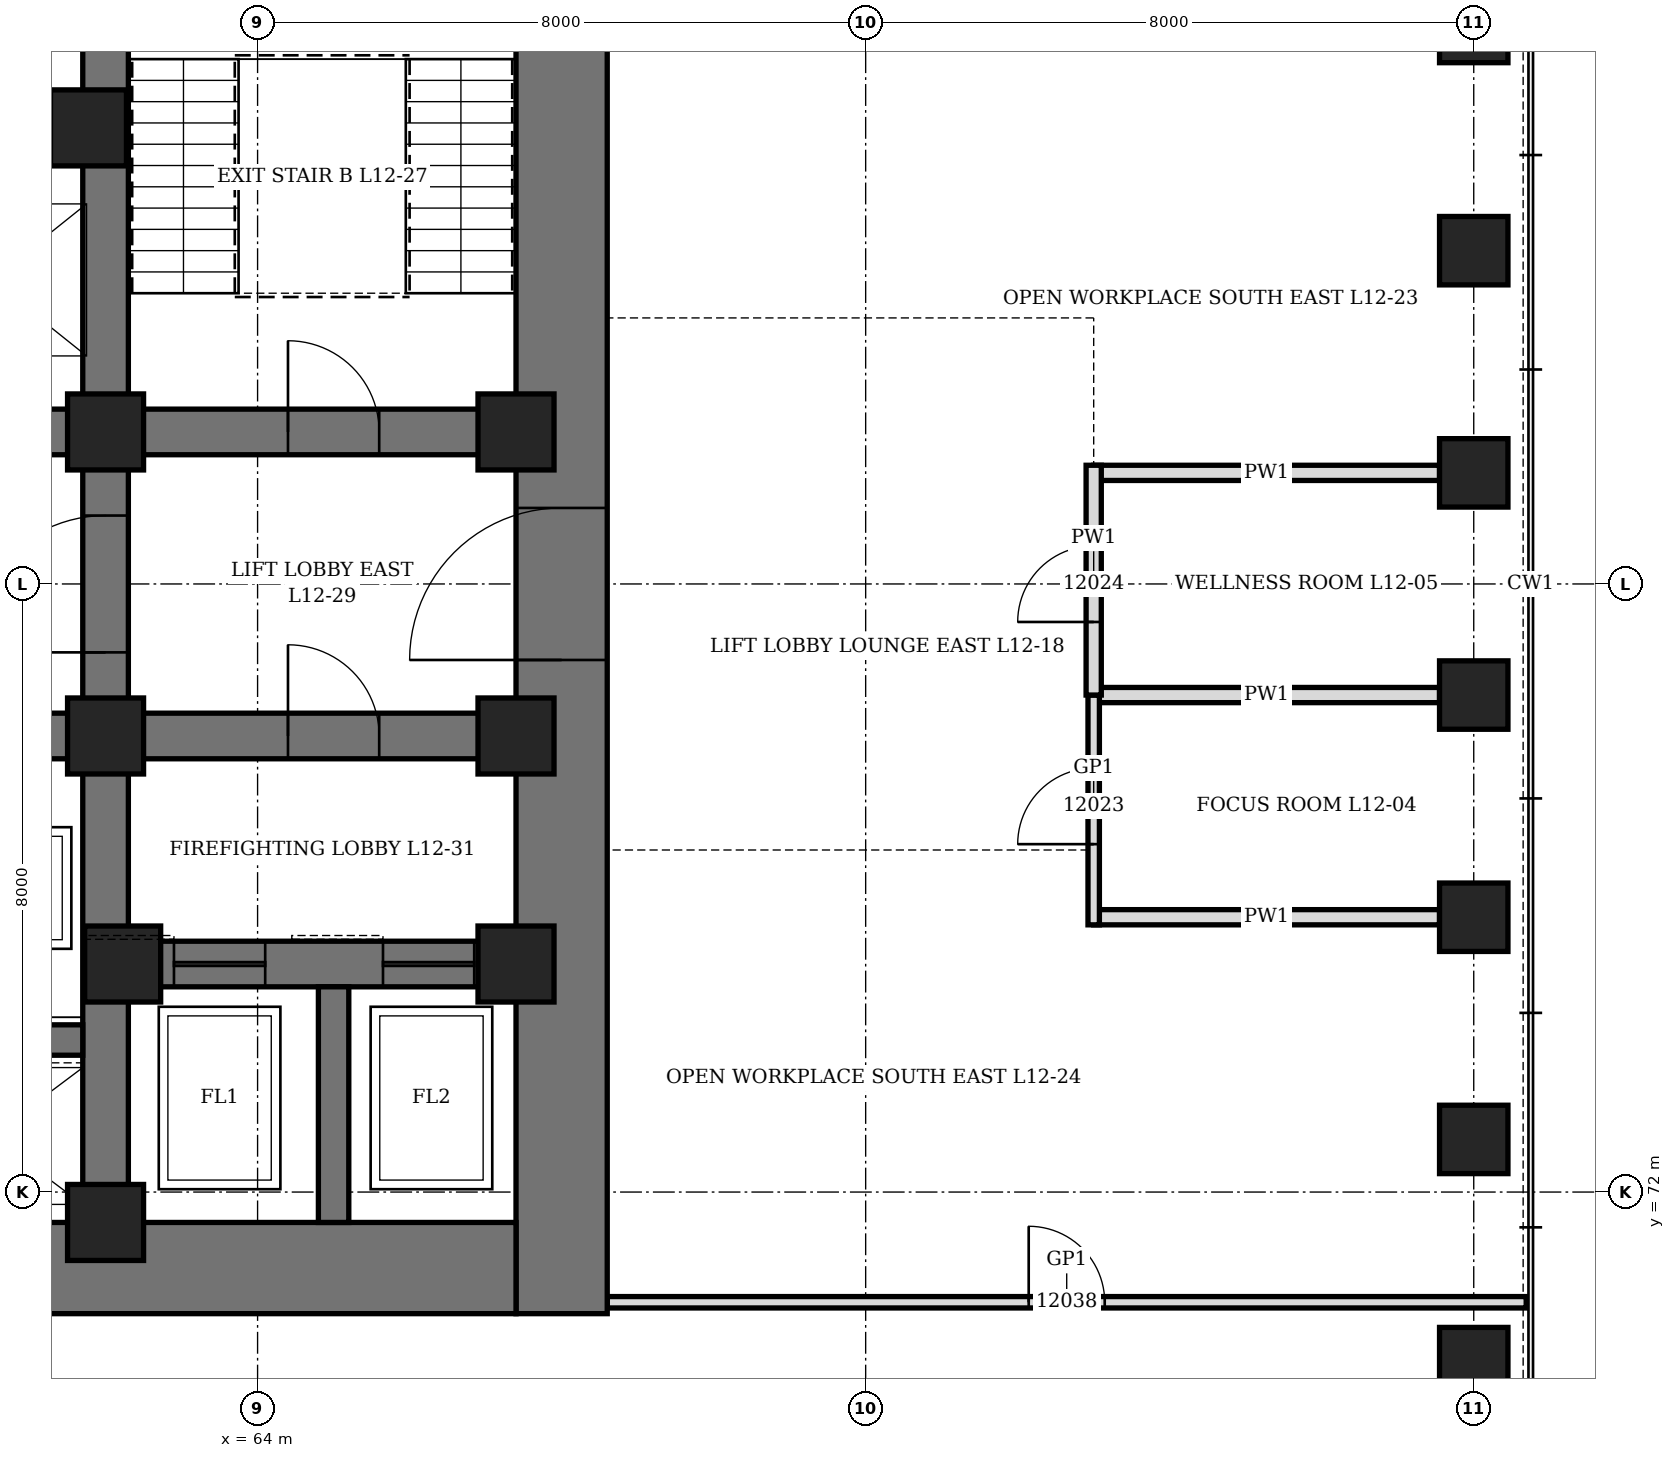
"""IFC4 building model, lengths in metres.
Left out: names, types, materials, properties, quantities, classifications, styles, units other than length and angle.
Written with IfcOpenShell. Run it as: python <this file> out.ifc"""

import sys

from ifc_helpers import new_model, si_unit, direction, frame, frame_2d, origin, origin_2d, place, context, subcontext, project, spatial, rectangle, hollow_rectangle, extrude, element, fill, save


model = new_model("IFC4")
c1 = context("Model", 3, precision=1e-05, world=origin(), true_north=direction((0.0, 1.0)))
c2 = subcontext(c1, "Body", "Model", "MODEL_VIEW")
j1 = project(units=[si_unit("LENGTHUNIT", "METRE"), si_unit("PLANEANGLEUNIT", "RADIAN")], contexts=[c1])
p1 = place(None, origin())
s1 = spatial("IfcSite", under=j1, at=p1, CompositionType="ELEMENT")
p2 = place(p1, origin())
s2 = spatial("IfcBuilding", under=s1, at=p2, CompositionType="ELEMENT")
p3 = place(p2, frame((0.0, 0.0, 60.1)))
s3 = spatial("IfcBuildingStorey", under=s2, at=p3, CompositionType="ELEMENT", Elevation=60.1)
for number, where, z_axis, x_axis in (
    (1, (80.0, 69.769, 0.0), (0.0, 0.0, 1.0), (0.0, 1.0, 0.0)),
    (2, (80.0, 72.692, 0.0), (0.0, 0.0, 1.0), (0.0, 1.0, 0.0)),
    (3, (80.0, 75.615, 0.0), (0.0, 0.0, 1.0), (0.0, 1.0, 0.0)),
    (4, (80.0, 78.539, 0.0), (0.0, 0.0, 1.0), (0.0, 1.0, 0.0)),
    (5, (80.0, 81.461, 0.0), (0.0, 0.0, 1.0), (0.0, 1.0, 0.0)),
    (6, (80.0, 84.385, 0.0), (0.0, 0.0, 1.0), (0.0, 1.0, 0.0)),
    (7, (80.0, 87.308, 0.0), (0.0, 0.0, 1.0), (0.0, 1.0, 0.0)),
):
    element("IfcColumn", number, at=place(p3, frame(where, z_axis=z_axis, x_axis=x_axis)), inside=s3, PredefinedType="COLUMN", context=c2, shape_type="SweptSolid", body=[
        extrude(hollow_rectangle(XDim=0.9, YDim=0.9, WallThickness=0.12, at=origin_2d()), origin(), (0.0, 0.0, 1.0), 4.2),
    ])
p4 = place(p3, frame((68.0, 70.4, 0.0), z_axis=(0.0, 0.0, 1.0), x_axis=(0.0, 1.0, 0.0)))
e8 = element("IfcWall", 8, at=p4, inside=s3, PredefinedType="SHEAR", context=c2, shape_type="SweptSolid", body=[
    extrude(rectangle(XDim=19.2, YDim=1.2, at=frame_2d((9.6, 0.0))), origin(), (0.0, 0.0, 1.0), 4.2),
])
p5 = place(p4, frame((8.6, 0.0, 0.0)))
e9 = element("IfcOpeningElement", 9, at=p5, cuts=e8, PredefinedType="OPENING", context=c2, shape_type="SweptSolid", body=[
    extrude(rectangle(XDim=2.0, YDim=2.4, at=frame_2d((1.0, 1.2))), frame((0.0, 0.61, 0.0), z_axis=(0.0, -1.0, 0.0), x_axis=(1.0, 0.0, 0.0)), (0.0, 0.0, 1.0), 1.22),
])
p6 = place(p3, frame((44.6, 71.0, 0.0), z_axis=(0.0, 0.0, 1.0), x_axis=(1.0, 0.0, 0.0)))
e10 = element("IfcWall", 10, at=p6, inside=s3, PredefinedType="SHEAR", context=c2, shape_type="SweptSolid", body=[
    extrude(rectangle(XDim=22.8, YDim=1.2, at=frame_2d((11.4, 0.0))), origin(), (0.0, 0.0, 1.0), 4.2),
])
p7 = place(p3, frame((62.0, 71.6, 0.0), z_axis=(0.0, 0.0, 1.0), x_axis=(0.0, 1.0, 0.0)))
e11 = element("IfcWall", 11, at=p7, inside=s3, PredefinedType="SHEAR", context=c2, shape_type="SweptSolid", body=[
    extrude(rectangle(XDim=16.8, YDim=0.6, at=frame_2d((8.4, 0.0))), origin(), (0.0, 0.0, 1.0), 4.2),
])
p8 = place(p7, frame((7.5, 0.0, 0.0)))
e12 = element("IfcOpeningElement", 12, at=p8, cuts=e11, PredefinedType="OPENING", context=c2, shape_type="SweptSolid", body=[
    extrude(rectangle(XDim=1.8, YDim=2.4, at=frame_2d((0.9, 1.2))), frame((0.0, 0.31, 0.0), z_axis=(0.0, -1.0, 0.0), x_axis=(1.0, 0.0, 0.0)), (0.0, 0.0, 1.0), 0.62),
])
p9 = place(p3, frame((62.3, 75.0, 0.0), z_axis=(0.0, 0.0, 1.0), x_axis=(1.0, 0.0, 0.0)))
e13 = element("IfcWall", 13, at=p9, inside=s3, PredefinedType="SHEAR", context=c2, shape_type="SweptSolid", body=[
    extrude(rectangle(XDim=5.1, YDim=0.6, at=frame_2d((2.55, 0.0))), origin(), (0.0, 0.0, 1.0), 4.2),
])
p10 = place(p9, frame((0.6, 0.0, 0.0)))
e14 = element("IfcOpeningElement", 14, at=p10, cuts=e13, PredefinedType="OPENING", context=c2, shape_type="SweptSolid", body=[
    extrude(rectangle(XDim=1.2, YDim=2.2, at=frame_2d((0.6, 1.1))), frame((0.0, 0.31, 0.0), z_axis=(0.0, -1.0, 0.0), x_axis=(1.0, 0.0, 0.0)), (0.0, 0.0, 1.0), 0.62),
])
p11 = place(p9, frame((3.35, 0.0, 0.0)))
e15 = element("IfcOpeningElement", 15, at=p11, cuts=e13, PredefinedType="OPENING", context=c2, shape_type="SweptSolid", body=[
    extrude(rectangle(XDim=1.2, YDim=2.2, at=frame_2d((0.6, 1.1))), frame((0.0, 0.31, 0.0), z_axis=(0.0, -1.0, 0.0), x_axis=(1.0, 0.0, 0.0)), (0.0, 0.0, 1.0), 0.62),
])
p12 = place(p3, frame((62.3, 78.0, 0.0), z_axis=(0.0, 0.0, 1.0), x_axis=(1.0, 0.0, 0.0)))
e16 = element("IfcWall", 16, at=p12, inside=s3, PredefinedType="SHEAR", context=c2, shape_type="SweptSolid", body=[
    extrude(rectangle(XDim=5.1, YDim=0.6, at=frame_2d((2.55, 0.0))), origin(), (0.0, 0.0, 1.0), 4.2),
])
p13 = place(p12, frame((2.1, 0.0, 0.0)))
e17 = element("IfcOpeningElement", 17, at=p13, cuts=e16, PredefinedType="OPENING", context=c2, shape_type="SweptSolid", body=[
    extrude(rectangle(XDim=1.2, YDim=2.1, at=frame_2d((0.6, 1.05))), frame((0.0, 0.31, 0.0), z_axis=(0.0, -1.0, 0.0), x_axis=(1.0, 0.0, 0.0)), (0.0, 0.0, 1.0), 0.62),
])
p14 = place(p3, frame((62.3, 82.0, 0.0), z_axis=(0.0, 0.0, 1.0), x_axis=(1.0, 0.0, 0.0)))
e18 = element("IfcWall", 18, at=p14, inside=s3, PredefinedType="SHEAR", context=c2, shape_type="SweptSolid", body=[
    extrude(rectangle(XDim=5.1, YDim=0.6, at=frame_2d((2.55, 0.0))), origin(), (0.0, 0.0, 1.0), 4.2),
])
p15 = place(p14, frame((2.1, 0.0, 0.0)))
e19 = element("IfcOpeningElement", 19, at=p15, cuts=e18, PredefinedType="OPENING", context=c2, shape_type="SweptSolid", body=[
    extrude(rectangle(XDim=1.2, YDim=2.1, at=frame_2d((0.6, 1.05))), frame((0.0, 0.31, 0.0), z_axis=(0.0, -1.0, 0.0), x_axis=(1.0, 0.0, 0.0)), (0.0, 0.0, 1.0), 0.62),
])
p16 = place(p3, frame((50.3, 78.0, 0.0), z_axis=(0.0, 0.0, 1.0), x_axis=(1.0, 0.0, 0.0)))
e20 = element("IfcWall", 20, at=p16, inside=s3, PredefinedType="SHEAR", context=c2, shape_type="SweptSolid", body=[
    extrude(rectangle(XDim=11.4, YDim=0.6, at=frame_2d((5.7, 0.0))), origin(), (0.0, 0.0, 1.0), 4.2),
])
p17 = place(p16, frame((0.65, 0.0, 0.0)))
e21 = element("IfcOpeningElement", 21, at=p17, cuts=e20, PredefinedType="OPENING", context=c2, shape_type="SweptSolid", body=[
    extrude(rectangle(XDim=1.1, YDim=2.2, at=frame_2d((0.55, 1.1))), frame((0.0, 0.31, 0.0), z_axis=(0.0, -1.0, 0.0), x_axis=(1.0, 0.0, 0.0)), (0.0, 0.0, 1.0), 0.62),
])
p18 = place(p16, frame((3.65, 0.0, 0.0)))
e22 = element("IfcOpeningElement", 22, at=p18, cuts=e20, PredefinedType="OPENING", context=c2, shape_type="SweptSolid", body=[
    extrude(rectangle(XDim=1.1, YDim=2.2, at=frame_2d((0.55, 1.1))), frame((0.0, 0.31, 0.0), z_axis=(0.0, -1.0, 0.0), x_axis=(1.0, 0.0, 0.0)), (0.0, 0.0, 1.0), 0.62),
])
p19 = place(p16, frame((6.65, 0.0, 0.0)))
e23 = element("IfcOpeningElement", 23, at=p19, cuts=e20, PredefinedType="OPENING", context=c2, shape_type="SweptSolid", body=[
    extrude(rectangle(XDim=1.1, YDim=2.2, at=frame_2d((0.55, 1.1))), frame((0.0, 0.31, 0.0), z_axis=(0.0, -1.0, 0.0), x_axis=(1.0, 0.0, 0.0)), (0.0, 0.0, 1.0), 0.62),
])
p20 = place(p16, frame((9.65, 0.0, 0.0)))
e24 = element("IfcOpeningElement", 24, at=p20, cuts=e20, PredefinedType="OPENING", context=c2, shape_type="SweptSolid", body=[
    extrude(rectangle(XDim=1.1, YDim=2.2, at=frame_2d((0.55, 1.1))), frame((0.0, 0.31, 0.0), z_axis=(0.0, -1.0, 0.0), x_axis=(1.0, 0.0, 0.0)), (0.0, 0.0, 1.0), 0.62),
])
for number, where, z_axis, x_axis in (
    (25, (50.3, 82.0, 0.0), (0.0, 0.0, 1.0), (1.0, 0.0, 0.0)),
    (26, (50.3, 86.0, 0.0), (0.0, 0.0, 1.0), (1.0, 0.0, 0.0)),
):
    element("IfcWall", number, at=place(p3, frame(where, z_axis=z_axis, x_axis=x_axis)), inside=s3, PredefinedType="SHEAR", context=c2, shape_type="SweptSolid", body=[
        extrude(rectangle(XDim=11.4, YDim=0.6, at=frame_2d((5.7, 0.0))), origin(), (0.0, 0.0, 1.0), 4.2),
    ])
p21 = place(p3, frame((50.3, 74.0, 0.0), z_axis=(0.0, 0.0, 1.0), x_axis=(1.0, 0.0, 0.0)))
e27 = element("IfcWall", 27, at=p21, inside=s3, PredefinedType="SHEAR", context=c2, shape_type="SweptSolid", body=[
    extrude(rectangle(XDim=11.4, YDim=0.4, at=frame_2d((5.7, 0.0))), origin(), (0.0, 0.0, 1.0), 4.2),
])
p22 = place(p3, frame((65.0, 71.6, 0.0), z_axis=(0.0, 0.0, 1.0), x_axis=(0.0, 1.0, 0.0)))
e28 = element("IfcWall", 28, at=p22, inside=s3, PredefinedType="SHEAR", context=c2, shape_type="SweptSolid", body=[
    extrude(rectangle(XDim=3.1, YDim=0.4, at=frame_2d((1.55, 0.0))), origin(), (0.0, 0.0, 1.0), 4.2),
])
for number, where, z_axis, x_axis in (
    (29, (61.775, 86.0, 0.0), (0.0, 0.0, 1.0), (1.0, 0.0, 0.0)),
    (30, (62.0, 71.6, 0.0), (0.0, 0.0, 1.0), (1.0, 0.0, 0.0)),
    (31, (62.0, 78.0, 0.0), (0.0, 0.0, 1.0), (1.0, 0.0, 0.0)),
    (32, (62.0, 82.0, 0.0), (0.0, 0.0, 1.0), (1.0, 0.0, 0.0)),
    (33, (62.225, 75.0, 0.0), (0.0, 0.0, 1.0), (1.0, 0.0, 0.0)),
    (34, (67.4, 75.0, 0.0), (0.0, 0.0, 1.0), (1.0, 0.0, 0.0)),
    (35, (67.4, 78.0, 0.0), (0.0, 0.0, 1.0), (1.0, 0.0, 0.0)),
    (36, (67.4, 82.0, 0.0), (0.0, 0.0, 1.0), (1.0, 0.0, 0.0)),
):
    element("IfcColumn", number, at=place(p3, frame(where, z_axis=z_axis, x_axis=x_axis)), inside=s3, PredefinedType="COLUMN", context=c2, shape_type="SweptSolid", body=[
        extrude(hollow_rectangle(XDim=1.0, YDim=1.0, WallThickness=0.15, at=origin_2d()), origin(), (0.0, 0.0, 1.0), 4.2),
    ])
for number, where, z_axis, x_axis in (
    (37, (75.0, 75.615, 0.0), (0.0, 0.0, 1.0), (1.0, 0.0, 0.0)),
    (38, (75.0, 78.539, 0.0), (0.0, 0.0, 1.0), (1.0, 0.0, 0.0)),
    (39, (75.0, 81.461, 0.0), (0.0, 0.0, 1.0), (1.0, 0.0, 0.0)),
):
    element("IfcWall", number, at=place(p3, frame(where, z_axis=z_axis, x_axis=x_axis)), inside=s3, PredefinedType="PARTITIONING", context=c2, shape_type="SweptSolid", body=[
        extrude(rectangle(XDim=4.55, YDim=0.2, at=frame_2d((2.275, 0.0))), origin(), (0.0, 0.0, 1.0), 3.428),
    ])
p23 = place(p3, frame((68.6, 70.55, 0.0), z_axis=(0.0, 0.0, 1.0), x_axis=(1.0, 0.0, 0.0)))
e40 = element("IfcWall", 40, at=p23, inside=s3, PredefinedType="PARTITIONING", context=c2, shape_type="SweptSolid", body=[
    extrude(rectangle(XDim=12.09, YDim=0.15, at=frame_2d((6.045, 0.0))), origin(), (0.0, 0.0, 1.0), 4.04),
])
p24 = place(p23, frame((5.545, 0.0, 0.0)))
e41 = element("IfcOpeningElement", 41, at=p24, cuts=e40, PredefinedType="OPENING", context=c2, shape_type="SweptSolid", body=[
    extrude(rectangle(XDim=1.0, YDim=2.4, at=frame_2d((0.5, 1.2))), frame((0.0, 0.085, 0.0), z_axis=(0.0, -1.0, 0.0), x_axis=(1.0, 0.0, 0.0)), (0.0, 0.0, 1.0), 0.17),
])
p25 = place(p3, frame((75.0, 75.515, 0.0), z_axis=(0.0, 0.0, 1.0), x_axis=(0.0, 1.0, 0.0)))
e42 = element("IfcWall", 42, at=p25, inside=s3, PredefinedType="PARTITIONING", context=c2, shape_type="SweptSolid", body=[
    extrude(rectangle(XDim=3.023, YDim=0.15, at=frame_2d((1.512, 0.0))), origin(), (0.0, 0.0, 1.0), 4.04),
])
p26 = place(p25, frame((1.062, 0.0, 0.0)))
e43 = element("IfcOpeningElement", 43, at=p26, cuts=e42, PredefinedType="OPENING", context=c2, shape_type="SweptSolid", body=[
    extrude(rectangle(XDim=1.0, YDim=2.4, at=frame_2d((0.5, 1.2))), frame((0.0, 0.085, 0.0), z_axis=(0.0, -1.0, 0.0), x_axis=(1.0, 0.0, 0.0)), (0.0, 0.0, 1.0), 0.17),
])
p27 = place(p3, frame((75.0, 78.539, 0.0), z_axis=(0.0, 0.0, 1.0), x_axis=(0.0, 1.0, 0.0)))
e44 = element("IfcWall", 44, at=p27, inside=s3, PredefinedType="PARTITIONING", context=c2, shape_type="SweptSolid", body=[
    extrude(rectangle(XDim=3.023, YDim=0.2, at=frame_2d((1.511, 0.0))), origin(), (0.0, 0.0, 1.0), 4.04),
])
p28 = place(p27, frame((0.961, 0.0, 0.0)))
e45 = element("IfcOpeningElement", 45, at=p28, cuts=e44, PredefinedType="OPENING", context=c2, shape_type="SweptSolid", body=[
    extrude(rectangle(XDim=1.0, YDim=2.1, at=frame_2d((0.5, 1.05))), frame((0.0, 0.11, 0.0), z_axis=(0.0, -1.0, 0.0), x_axis=(1.0, 0.0, 0.0)), (0.0, 0.0, 1.0), 0.22),
])
p29 = place(p15, origin())
e46 = element("IfcDoor", 46, at=p29, inside=s3, OperationType="SINGLE_SWING_LEFT", PredefinedType="DOOR", context=c2, shape_type="SweptSolid", body=[
    extrude(rectangle(XDim=1.2, YDim=2.1, at=frame_2d((0.6, 1.05))), frame((0.0, 0.3, 0.0), z_axis=(0.0, -1.0, 0.0), x_axis=(1.0, 0.0, 0.0)), (0.0, 0.0, 1.0), 0.6),
])
fill(e19, e46)
p30 = place(p5, origin())
e47 = element("IfcDoor", 47, at=p30, inside=s3, OperationType="DOUBLE_DOOR_SINGLE_SWING", PredefinedType="DOOR", context=c2, shape_type="SweptSolid", body=[
    extrude(rectangle(XDim=2.0, YDim=2.4, at=frame_2d((1.0, 1.2))), frame((0.0, 0.35, 0.0), z_axis=(0.0, -1.0, 0.0), x_axis=(1.0, 0.0, 0.0)), (0.0, 0.0, 1.0), 0.7),
])
fill(e9, e47)
p31 = place(p8, origin())
e48 = element("IfcDoor", 48, at=p31, inside=s3, OperationType="DOUBLE_DOOR_SINGLE_SWING", PredefinedType="DOOR", context=c2, shape_type="SweptSolid", body=[
    extrude(rectangle(XDim=1.8, YDim=2.4, at=frame_2d((0.9, 1.2))), frame((0.0, 0.3, 0.0), z_axis=(0.0, -1.0, 0.0), x_axis=(1.0, 0.0, 0.0)), (0.0, 0.0, 1.0), 0.6),
])
fill(e12, e48)
p32 = place(p13, origin())
e49 = element("IfcDoor", 49, at=p32, inside=s3, OperationType="SINGLE_SWING_RIGHT", PredefinedType="DOOR", context=c2, shape_type="SweptSolid", body=[
    extrude(rectangle(XDim=1.2, YDim=2.1, at=frame_2d((0.6, 1.05))), frame((0.0, 0.3, 0.0), z_axis=(0.0, -1.0, 0.0), x_axis=(1.0, 0.0, 0.0)), (0.0, 0.0, 1.0), 0.6),
])
fill(e17, e49)
p33 = place(p10, origin())
e50 = element("IfcDoor", 50, at=p33, inside=s3, OperationType="SLIDING_TO_LEFT", PredefinedType="DOOR", context=c2, shape_type="SweptSolid", body=[
    extrude(rectangle(XDim=1.2, YDim=2.2, at=frame_2d((0.6, 1.1))), frame((0.0, 0.3, 0.0), z_axis=(0.0, -1.0, 0.0), x_axis=(1.0, 0.0, 0.0)), (0.0, 0.0, 1.0), 0.6),
])
fill(e14, e50)
p34 = place(p11, origin())
e51 = element("IfcDoor", 51, at=p34, inside=s3, OperationType="SLIDING_TO_LEFT", PredefinedType="DOOR", context=c2, shape_type="SweptSolid", body=[
    extrude(rectangle(XDim=1.2, YDim=2.2, at=frame_2d((0.6, 1.1))), frame((0.0, 0.3, 0.0), z_axis=(0.0, -1.0, 0.0), x_axis=(1.0, 0.0, 0.0)), (0.0, 0.0, 1.0), 0.6),
])
fill(e15, e51)
p35 = place(p26, origin())
e52 = element("IfcDoor", 52, at=p35, inside=s3, OperationType="SINGLE_SWING_RIGHT", PredefinedType="DOOR", context=c2, shape_type="SweptSolid", body=[
    extrude(rectangle(XDim=1.0, YDim=2.4, at=frame_2d((0.5, 1.2))), frame((0.0, 0.075, 0.0), z_axis=(0.0, -1.0, 0.0), x_axis=(1.0, 0.0, 0.0)), (0.0, 0.0, 1.0), 0.149),
])
fill(e43, e52)
p36 = place(p28, origin())
e53 = element("IfcDoor", 53, at=p36, inside=s3, OperationType="SINGLE_SWING_LEFT", PredefinedType="DOOR", context=c2, shape_type="SweptSolid", body=[
    extrude(rectangle(XDim=1.0, YDim=2.1, at=frame_2d((0.5, 1.05))), frame((0.0, 0.1, 0.0), z_axis=(0.0, -1.0, 0.0), x_axis=(1.0, 0.0, 0.0)), (0.0, 0.0, 1.0), 0.199),
])
fill(e45, e53)
p37 = place(p24, origin())
e54 = element("IfcDoor", 54, at=p37, inside=s3, OperationType="SINGLE_SWING_RIGHT", PredefinedType="DOOR", context=c2, shape_type="SweptSolid", body=[
    extrude(rectangle(XDim=1.0, YDim=2.4, at=frame_2d((0.5, 1.2))), frame((0.0, 0.075, 0.0), z_axis=(0.0, -1.0, 0.0), x_axis=(1.0, 0.0, 0.0)), (0.0, 0.0, 1.0), 0.149),
])
fill(e41, e54)
save(model, sys.argv[1])
